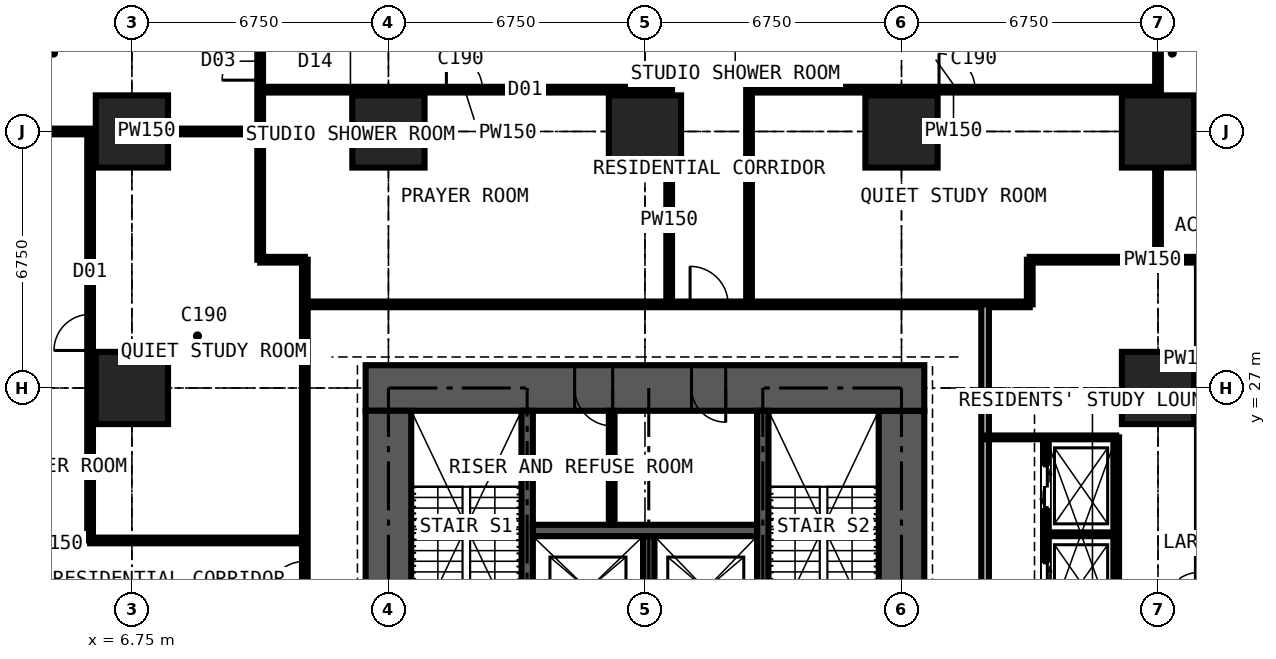
"""IFC4 building model, lengths in metres.
Left out: names, types, materials, properties, quantities, classifications, styles, units other than length and angle.
Written with IfcOpenShell. Run it as: python <this file> out.ifc"""

import sys

from ifc_helpers import new_model, si_unit, direction, frame, frame_2d, origin, origin_2d, place, context, subcontext, project, spatial, rectangle, extrude, element, fill, save


model = new_model("IFC4")
c1 = context("Model", 3, precision=1e-05, world=origin(), true_north=direction((0.0, 1.0)))
c2 = subcontext(c1, "Body", "Model", "MODEL_VIEW")
j1 = project(units=[si_unit("LENGTHUNIT", "METRE"), si_unit("PLANEANGLEUNIT", "RADIAN")], contexts=[c1])
p1 = place(None, origin())
s1 = spatial("IfcSite", under=j1, at=p1, CompositionType="ELEMENT")
p2 = place(p1, origin())
s2 = spatial("IfcBuilding", under=s1, at=p2, CompositionType="ELEMENT")
p3 = place(p2, frame((0.0, 0.0, 39.6)))
s3 = spatial("IfcBuildingStorey", under=s2, at=p3, CompositionType="ELEMENT", Elevation=39.6)
for number, where, z_axis, x_axis in (
    (1, (6.75, 27.0, 0.0), (0.0, 0.0, 1.0), (1.0, 0.0, 0.0)),
    (2, (6.75, 33.75, 0.0), (0.0, 0.0, 1.0), (1.0, 0.0, 0.0)),
    (3, (13.5, 33.75, 0.0), (0.0, 0.0, 1.0), (1.0, 0.0, 0.0)),
    (4, (20.25, 33.75, 0.0), (0.0, 0.0, 1.0), (1.0, 0.0, 0.0)),
    (5, (27.0, 33.75, 0.0), (0.0, 0.0, 1.0), (1.0, 0.0, 0.0)),
    (6, (33.75, 27.0, 0.0), (0.0, 0.0, 1.0), (1.0, 0.0, 0.0)),
    (7, (33.75, 33.75, 0.0), (0.0, 0.0, 1.0), (1.0, 0.0, 0.0)),
):
    element("IfcColumn", number, at=place(p3, frame(where, z_axis=z_axis, x_axis=x_axis)), inside=s3, PredefinedType="COLUMN", context=c2, shape_type="SweptSolid", body=[
        extrude(rectangle(XDim=1.9, YDim=1.9, at=origin_2d()), origin(), (0.0, 0.0, 1.0), 3.6),
    ])
p4 = place(p3, frame((27.0, 14.1, 0.0), z_axis=(0.0, 0.0, 1.0), x_axis=(0.0, 1.0, 0.0)))
e8 = element("IfcWall", 8, at=p4, inside=s3, PredefinedType="SHEAR", context=c2, shape_type="SweptSolid", body=[
    extrude(rectangle(XDim=12.3, YDim=1.2, at=frame_2d((6.15, 0.0))), origin(), (0.0, 0.0, 1.0), 3.6),
])
p5 = place(p4, frame((3.65, 0.0, 0.0)))
e9 = element("IfcOpeningElement", 9, at=p5, cuts=e8, PredefinedType="OPENING", context=c2, shape_type="SweptSolid", body=[
    extrude(rectangle(XDim=1.2, YDim=2.2, at=frame_2d((0.6, 1.1))), frame((0.0, 0.61, 0.0), z_axis=(0.0, -1.0, 0.0), x_axis=(1.0, 0.0, 0.0)), (0.0, 0.0, 1.0), 1.22),
])
p6 = place(p3, frame((27.6, 27.0, 0.0), z_axis=(0.0, 0.0, 1.0), x_axis=(-1.0, 0.0, 0.0)))
e10 = element("IfcWall", 10, at=p6, inside=s3, PredefinedType="SHEAR", context=c2, shape_type="SweptSolid", body=[
    extrude(rectangle(XDim=14.7, YDim=1.2, at=frame_2d((7.35, 0.0))), origin(), (0.0, 0.0, 1.0), 3.6),
])
p7 = place(p6, frame((5.225, 0.0, 0.0)))
e11 = element("IfcOpeningElement", 11, at=p7, cuts=e10, PredefinedType="OPENING", context=c2, shape_type="SweptSolid", body=[
    extrude(rectangle(XDim=0.9, YDim=2.2, at=frame_2d((0.45, 1.1))), frame((0.0, 0.61, 0.0), z_axis=(0.0, -1.0, 0.0), x_axis=(1.0, 0.0, 0.0)), (0.0, 0.0, 1.0), 1.22),
])
p8 = place(p6, frame((8.2, 0.0, 0.0)))
e12 = element("IfcOpeningElement", 12, at=p8, cuts=e10, PredefinedType="OPENING", context=c2, shape_type="SweptSolid", body=[
    extrude(rectangle(XDim=1.0, YDim=2.2, at=frame_2d((0.5, 1.1))), frame((0.0, 0.61, 0.0), z_axis=(0.0, -1.0, 0.0), x_axis=(1.0, 0.0, 0.0)), (0.0, 0.0, 1.0), 1.22),
])
p9 = place(p3, frame((13.5, 26.4, 0.0), z_axis=(0.0, 0.0, 1.0), x_axis=(0.0, -1.0, 0.0)))
e13 = element("IfcWall", 13, at=p9, inside=s3, PredefinedType="SHEAR", context=c2, shape_type="SweptSolid", body=[
    extrude(rectangle(XDim=12.3, YDim=1.2, at=frame_2d((6.15, 0.0))), origin(), (0.0, 0.0, 1.0), 3.6),
])
p10 = place(p9, frame((7.45, 0.0, 0.0)))
e14 = element("IfcOpeningElement", 14, at=p10, cuts=e13, PredefinedType="OPENING", context=c2, shape_type="SweptSolid", body=[
    extrude(rectangle(XDim=1.2, YDim=2.2, at=frame_2d((0.6, 1.1))), frame((0.0, 0.61, 0.0), z_axis=(0.0, -1.0, 0.0), x_axis=(1.0, 0.0, 0.0)), (0.0, 0.0, 1.0), 1.22),
])
for number, where, z_axis, x_axis in (
    (15, (17.15, 20.3, 0.0), (0.0, 0.0, 1.0), (0.0, 1.0, 0.0)),
    (16, (23.35, 20.3, 0.0), (0.0, 0.0, 1.0), (0.0, 1.0, 0.0)),
):
    element("IfcWall", number, at=place(p3, frame(where, z_axis=z_axis, x_axis=x_axis)), inside=s3, PredefinedType="SHEAR", context=c2, shape_type="SweptSolid", body=[
        extrude(rectangle(XDim=6.1, YDim=0.3, at=frame_2d((3.05, 0.0))), origin(), (0.0, 0.0, 1.0), 3.6),
    ])
p11 = place(p3, frame((20.35, 20.3, 0.0), z_axis=(0.0, 0.0, 1.0), x_axis=(0.0, 1.0, 0.0)))
e17 = element("IfcWall", 17, at=p11, inside=s3, PredefinedType="SHEAR", context=c2, shape_type="SweptSolid", body=[
    extrude(rectangle(XDim=2.8, YDim=0.3, at=frame_2d((1.4, 0.0))), origin(), (0.0, 0.0, 1.0), 3.6),
])
p12 = place(p3, frame((17.3, 23.25, 0.0), z_axis=(0.0, 0.0, 1.0), x_axis=(1.0, 0.0, 0.0)))
e18 = element("IfcWall", 18, at=p12, inside=s3, PredefinedType="SHEAR", context=c2, shape_type="SweptSolid", body=[
    extrude(rectangle(XDim=5.9, YDim=0.3, at=frame_2d((2.95, 0.0))), origin(), (0.0, 0.0, 1.0), 3.6),
])
p13 = place(p3, frame((19.375, 23.4, 0.0), z_axis=(0.0, 0.0, 1.0), x_axis=(0.0, 1.0, 0.0)))
e19 = element("IfcWall", 19, at=p13, inside=s3, PredefinedType="PARTITIONING", context=c2, shape_type="SweptSolid", body=[
    extrude(rectangle(XDim=3.0, YDim=0.15, at=frame_2d((1.5, 0.0))), origin(), (0.0, 0.0, 1.0), 3.375),
])
p14 = place(p3, frame((4.15, 33.75, 0.0), z_axis=(0.0, 0.0, 1.0), x_axis=(1.0, 0.0, 0.0)))
e20 = element("IfcWall", 20, at=p14, inside=s3, PredefinedType="PARTITIONING", context=c2, shape_type="SweptSolid", body=[
    extrude(rectangle(XDim=5.975, YDim=0.15, at=frame_2d((2.988, 0.0))), origin(), (0.0, 0.0, 1.0), 2.877),
])
p15 = place(p3, frame((5.65, 22.988, 0.0), z_axis=(0.0, 0.0, 1.0), x_axis=(0.0, 1.0, 0.0)))
e21 = element("IfcWall", 21, at=p15, inside=s3, PredefinedType="PARTITIONING", context=c2, shape_type="SweptSolid", body=[
    extrude(rectangle(XDim=10.762, YDim=0.15, at=frame_2d((5.381, 0.0))), origin(), (0.0, 0.0, 1.0), 3.375),
])
p16 = place(p15, frame((5.0, 0.0, 0.0)))
e22 = element("IfcOpeningElement", 22, at=p16, cuts=e21, PredefinedType="OPENING", context=c2, shape_type="SweptSolid", body=[
    extrude(rectangle(XDim=0.95, YDim=2.2, at=frame_2d((0.475, 1.1))), frame((0.0, 0.085, 0.0), z_axis=(0.0, -1.0, 0.0), x_axis=(1.0, 0.0, 0.0)), (0.0, 0.0, 1.0), 0.17),
])
p17 = place(p3, frame((5.65, 22.988, 0.0), z_axis=(0.0, 0.0, 1.0), x_axis=(1.0, 0.0, 0.0)))
e23 = element("IfcWall", 23, at=p17, inside=s3, PredefinedType="PARTITIONING", context=c2, shape_type="SweptSolid", body=[
    extrude(rectangle(XDim=5.65, YDim=0.15, at=frame_2d((2.825, 0.0))), origin(), (0.0, 0.0, 1.0), 3.375),
])
p18 = place(p3, frame((10.125, 30.375, 0.0), z_axis=(0.0, 0.0, 1.0), x_axis=(0.0, 1.0, 0.0)))
e24 = element("IfcWall", 24, at=p18, inside=s3, PredefinedType="PARTITIONING", context=c2, shape_type="SweptSolid", body=[
    extrude(rectangle(XDim=10.859, YDim=0.15, at=frame_2d((5.429, 0.0))), origin(), (0.0, 0.0, 1.0), 3.375),
])
p19 = place(p18, frame((4.725, 0.0, 0.0)))
e25 = element("IfcOpeningElement", 25, at=p19, cuts=e24, PredefinedType="OPENING", context=c2, shape_type="SweptSolid", body=[
    extrude(rectangle(XDim=1.0, YDim=2.2, at=frame_2d((0.5, 1.1))), frame((0.0, 0.085, 0.0), z_axis=(0.0, -1.0, 0.0), x_axis=(1.0, 0.0, 0.0)), (0.0, 0.0, 1.0), 0.17),
])
p20 = place(p3, frame((10.125, 30.375, 0.0), z_axis=(0.0, 0.0, 1.0), x_axis=(1.0, 0.0, 0.0)))
e26 = element("IfcWall", 26, at=p20, inside=s3, PredefinedType="PARTITIONING", context=c2, shape_type="SweptSolid", body=[
    extrude(rectangle(XDim=1.175, YDim=0.15, at=frame_2d((0.587, 0.0))), origin(), (0.0, 0.0, 1.0), 3.375),
])
p21 = place(p3, frame((10.125, 34.85, 0.0), z_axis=(0.0, 0.0, 1.0), x_axis=(1.0, 0.0, 0.0)))
e27 = element("IfcWall", 27, at=p21, inside=s3, PredefinedType="PARTITIONING", context=c2, shape_type="SweptSolid", body=[
    extrude(rectangle(XDim=10.762, YDim=0.15, at=frame_2d((5.381, 0.0))), origin(), (0.0, 0.0, 1.0), 3.375),
])
p22 = place(p21, frame((4.9, 0.0, 0.0)))
e28 = element("IfcOpeningElement", 28, at=p22, cuts=e27, PredefinedType="OPENING", context=c2, shape_type="SweptSolid", body=[
    extrude(rectangle(XDim=0.95, YDim=2.2, at=frame_2d((0.475, 1.1))), frame((0.0, 0.085, 0.0), z_axis=(0.0, -1.0, 0.0), x_axis=(1.0, 0.0, 0.0)), (0.0, 0.0, 1.0), 0.17),
])
p23 = place(p3, frame((11.3, 11.3, 0.0), z_axis=(0.0, 0.0, 1.0), x_axis=(0.0, 1.0, 0.0)))
e29 = element("IfcWall", 29, at=p23, inside=s3, PredefinedType="PARTITIONING", context=c2, shape_type="SweptSolid", body=[
    extrude(rectangle(XDim=19.075, YDim=0.15, at=frame_2d((9.538, 0.0))), origin(), (0.0, 0.0, 1.0), 3.375),
])
p24 = place(p23, frame((10.137, 0.0, 0.0)))
e30 = element("IfcOpeningElement", 30, at=p24, cuts=e29, PredefinedType="OPENING", context=c2, shape_type="SweptSolid", body=[
    extrude(rectangle(XDim=1.0, YDim=2.2, at=frame_2d((0.5, 1.1))), frame((0.0, 0.085, 0.0), z_axis=(0.0, -1.0, 0.0), x_axis=(1.0, 0.0, 0.0)), (0.0, 0.0, 1.0), 0.17),
])
p25 = place(p3, frame((11.3, 29.2, 0.0), z_axis=(0.0, 0.0, 1.0), x_axis=(1.0, 0.0, 0.0)))
e31 = element("IfcWall", 31, at=p25, inside=s3, PredefinedType="PARTITIONING", context=c2, shape_type="SweptSolid", body=[
    extrude(rectangle(XDim=19.075, YDim=0.15, at=frame_2d((9.538, 0.0))), origin(), (0.0, 0.0, 1.0), 3.375),
])
p26 = place(p25, frame((10.137, 0.0, 0.0)))
e32 = element("IfcOpeningElement", 32, at=p26, cuts=e31, PredefinedType="OPENING", context=c2, shape_type="SweptSolid", body=[
    extrude(rectangle(XDim=1.0, YDim=2.2, at=frame_2d((0.5, 1.1))), frame((0.0, 0.085, 0.0), z_axis=(0.0, -1.0, 0.0), x_axis=(1.0, 0.0, 0.0)), (0.0, 0.0, 1.0), 0.17),
])
p27 = place(p3, frame((20.887, 29.2, 0.0), z_axis=(0.0, 0.0, 1.0), x_axis=(0.0, 1.0, 0.0)))
e33 = element("IfcWall", 33, at=p27, inside=s3, PredefinedType="PARTITIONING", context=c2, shape_type="SweptSolid", body=[
    extrude(rectangle(XDim=5.65, YDim=0.15, at=frame_2d((2.825, 0.0))), origin(), (0.0, 0.0, 1.0), 3.375),
])
p28 = place(p3, frame((22.988, 34.85, 0.0), z_axis=(0.0, 0.0, 1.0), x_axis=(1.0, 0.0, 0.0)))
e34 = element("IfcWall", 34, at=p28, inside=s3, PredefinedType="PARTITIONING", context=c2, shape_type="SweptSolid", body=[
    extrude(rectangle(XDim=10.762, YDim=0.15, at=frame_2d((5.381, 0.0))), origin(), (0.0, 0.0, 1.0), 3.375),
])
p29 = place(p28, frame((5.0, 0.0, 0.0)))
e35 = element("IfcOpeningElement", 35, at=p29, cuts=e34, PredefinedType="OPENING", context=c2, shape_type="SweptSolid", body=[
    extrude(rectangle(XDim=0.95, YDim=2.2, at=frame_2d((0.475, 1.1))), frame((0.0, 0.085, 0.0), z_axis=(0.0, -1.0, 0.0), x_axis=(1.0, 0.0, 0.0)), (0.0, 0.0, 1.0), 0.17),
])
p30 = place(p3, frame((22.988, 29.2, 0.0), z_axis=(0.0, 0.0, 1.0), x_axis=(0.0, 1.0, 0.0)))
e36 = element("IfcWall", 36, at=p30, inside=s3, PredefinedType="PARTITIONING", context=c2, shape_type="SweptSolid", body=[
    extrude(rectangle(XDim=5.65, YDim=0.15, at=frame_2d((2.825, 0.0))), origin(), (0.0, 0.0, 1.0), 3.375),
])
p31 = place(p3, frame((29.2, 11.3, 0.0), z_axis=(0.0, 0.0, 1.0), x_axis=(0.0, 1.0, 0.0)))
e37 = element("IfcWall", 37, at=p31, inside=s3, PredefinedType="PARTITIONING", context=c2, shape_type="SweptSolid", body=[
    extrude(rectangle(XDim=17.9, YDim=0.2, at=frame_2d((8.95, 0.0))), origin(), (0.0, 0.0, 1.0), 3.375),
])
p32 = place(p31, frame((8.35, 0.0, 0.0)))
e38 = element("IfcOpeningElement", 38, at=p32, cuts=e37, PredefinedType="OPENING", context=c2, shape_type="SweptSolid", body=[
    extrude(rectangle(XDim=1.2, YDim=2.2, at=frame_2d((0.6, 1.1))), frame((0.0, 0.11, 0.0), z_axis=(0.0, -1.0, 0.0), x_axis=(1.0, 0.0, 0.0)), (0.0, 0.0, 1.0), 0.22),
])
p33 = place(p3, frame((29.2, 25.7, 0.0), z_axis=(0.0, 0.0, 1.0), x_axis=(1.0, 0.0, 0.0)))
e39 = element("IfcWall", 39, at=p33, inside=s3, PredefinedType="SHEAR", context=c2, shape_type="SweptSolid", body=[
    extrude(rectangle(XDim=3.45, YDim=0.1, at=frame_2d((1.725, 0.0))), origin(), (0.0, 0.0, 1.0), 3.375),
])
p34 = place(p3, frame((30.375, 29.2, 0.0), z_axis=(0.0, 0.0, 1.0), x_axis=(0.0, 1.0, 0.0)))
e40 = element("IfcWall", 40, at=p34, inside=s3, PredefinedType="PARTITIONING", context=c2, shape_type="SweptSolid", body=[
    extrude(rectangle(XDim=1.175, YDim=0.15, at=frame_2d((0.587, 0.0))), origin(), (0.0, 0.0, 1.0), 3.375),
])
p35 = place(p3, frame((30.375, 30.375, 0.0), z_axis=(0.0, 0.0, 1.0), x_axis=(1.0, 0.0, 0.0)))
e41 = element("IfcWall", 41, at=p35, inside=s3, PredefinedType="PARTITIONING", context=c2, shape_type="SweptSolid", body=[
    extrude(rectangle(XDim=10.859, YDim=0.15, at=frame_2d((5.429, 0.0))), origin(), (0.0, 0.0, 1.0), 3.375),
])
p36 = place(p35, frame((4.725, 0.0, 0.0)))
e42 = element("IfcOpeningElement", 42, at=p36, cuts=e41, PredefinedType="OPENING", context=c2, shape_type="SweptSolid", body=[
    extrude(rectangle(XDim=1.0, YDim=2.2, at=frame_2d((0.5, 1.1))), frame((0.0, 0.085, 0.0), z_axis=(0.0, -1.0, 0.0), x_axis=(1.0, 0.0, 0.0)), (0.0, 0.0, 1.0), 0.17),
])
p37 = place(p3, frame((30.8, 14.8, 0.0), z_axis=(0.0, 0.0, 1.0), x_axis=(0.0, 1.0, 0.0)))
e43 = element("IfcWall", 43, at=p37, inside=s3, PredefinedType="PARTITIONING", context=c2, shape_type="SweptSolid", body=[
    extrude(rectangle(XDim=10.9, YDim=0.15, at=frame_2d((5.45, 0.0))), origin(), (0.0, 0.0, 1.0), 3.375),
])
p38 = place(p37, frame((0.75, 0.0, 0.0)))
e44 = element("IfcOpeningElement", 44, at=p38, cuts=e43, PredefinedType="OPENING", context=c2, shape_type="SweptSolid", body=[
    extrude(rectangle(XDim=1.1, YDim=2.2, at=frame_2d((0.55, 1.1))), frame((0.0, 0.085, 0.0), z_axis=(0.0, -1.0, 0.0), x_axis=(1.0, 0.0, 0.0)), (0.0, 0.0, 1.0), 0.17),
])
p39 = place(p37, frame((3.25, 0.0, 0.0)))
e45 = element("IfcOpeningElement", 45, at=p39, cuts=e43, PredefinedType="OPENING", context=c2, shape_type="SweptSolid", body=[
    extrude(rectangle(XDim=1.1, YDim=2.2, at=frame_2d((0.55, 1.1))), frame((0.0, 0.085, 0.0), z_axis=(0.0, -1.0, 0.0), x_axis=(1.0, 0.0, 0.0)), (0.0, 0.0, 1.0), 0.17),
])
p40 = place(p37, frame((6.5, 0.0, 0.0)))
e46 = element("IfcOpeningElement", 46, at=p40, cuts=e43, PredefinedType="OPENING", context=c2, shape_type="SweptSolid", body=[
    extrude(rectangle(XDim=1.1, YDim=2.2, at=frame_2d((0.55, 1.1))), frame((0.0, 0.085, 0.0), z_axis=(0.0, -1.0, 0.0), x_axis=(1.0, 0.0, 0.0)), (0.0, 0.0, 1.0), 0.17),
])
p41 = place(p37, frame((9.05, 0.0, 0.0)))
e47 = element("IfcOpeningElement", 47, at=p41, cuts=e43, PredefinedType="OPENING", context=c2, shape_type="SweptSolid", body=[
    extrude(rectangle(XDim=1.1, YDim=2.2, at=frame_2d((0.55, 1.1))), frame((0.0, 0.085, 0.0), z_axis=(0.0, -1.0, 0.0), x_axis=(1.0, 0.0, 0.0)), (0.0, 0.0, 1.0), 0.17),
])
p42 = place(p3, frame((30.8, 23.15, 0.0), z_axis=(0.0, 0.0, 1.0), x_axis=(1.0, 0.0, 0.0)))
e48 = element("IfcWall", 48, at=p42, inside=s3, PredefinedType="SHEAR", context=c2, shape_type="SweptSolid", body=[
    extrude(rectangle(XDim=1.85, YDim=0.1, at=frame_2d((0.925, 0.0))), origin(), (0.0, 0.0, 1.0), 3.375),
])
p43 = place(p3, frame((32.65, 20.6, 0.0), z_axis=(0.0, 0.0, 1.0), x_axis=(0.0, 1.0, 0.0)))
e49 = element("IfcWall", 49, at=p43, inside=s3, PredefinedType="PARTITIONING", context=c2, shape_type="SweptSolid", body=[
    extrude(rectangle(XDim=5.1, YDim=0.15, at=frame_2d((2.55, 0.0))), origin(), (0.0, 0.0, 1.0), 3.375),
])
p44 = place(p3, frame((33.75, 30.375, 0.0), z_axis=(0.0, 0.0, 1.0), x_axis=(0.0, 1.0, 0.0)))
e50 = element("IfcWall", 50, at=p44, inside=s3, PredefinedType="PARTITIONING", context=c2, shape_type="SweptSolid", body=[
    extrude(rectangle(XDim=5.975, YDim=0.15, at=frame_2d((2.988, 0.0))), origin(), (0.0, 0.0, 1.0), 2.877),
])
p45 = place(p7, origin())
e51 = element("IfcDoor", 51, at=p45, inside=s3, OperationType="SINGLE_SWING_LEFT", PredefinedType="DOOR", context=c2, shape_type="SweptSolid", body=[
    extrude(rectangle(XDim=0.9, YDim=2.2, at=frame_2d((0.45, 1.1))), frame((0.0, 0.4, 0.0), z_axis=(0.0, -1.0, 0.0), x_axis=(1.0, 0.0, 0.0)), (0.0, 0.0, 1.0), 0.8),
])
fill(e11, e51)
p46 = place(p8, origin())
e52 = element("IfcDoor", 52, at=p46, inside=s3, OperationType="SINGLE_SWING_LEFT", PredefinedType="DOOR", context=c2, shape_type="SweptSolid", body=[
    extrude(rectangle(XDim=1.0, YDim=2.2, at=frame_2d((0.5, 1.1))), frame((0.0, 0.025, 0.0), z_axis=(0.0, -1.0, 0.0), x_axis=(1.0, 0.0, 0.0)), (0.0, 0.0, 1.0), 0.05),
])
fill(e12, e52)
p47 = place(p26, origin())
e53 = element("IfcDoor", 53, at=p47, inside=s3, OperationType="SINGLE_SWING_LEFT", PredefinedType="DOOR", context=c2, shape_type="SweptSolid", body=[
    extrude(rectangle(XDim=1.0, YDim=2.2, at=frame_2d((0.5, 1.1))), frame((0.0, 0.025, 0.0), z_axis=(0.0, -1.0, 0.0), x_axis=(1.0, 0.0, 0.0)), (0.0, 0.0, 1.0), 0.05),
])
fill(e32, e53)
p48 = place(p22, origin())
e54 = element("IfcDoor", 54, at=p48, inside=s3, OperationType="SINGLE_SWING_LEFT", PredefinedType="DOOR", context=c2, shape_type="SweptSolid", body=[
    extrude(rectangle(XDim=0.95, YDim=2.2, at=frame_2d((0.475, 1.1))), frame((0.0, 0.025, 0.0), z_axis=(0.0, -1.0, 0.0), x_axis=(1.0, 0.0, 0.0)), (0.0, 0.0, 1.0), 0.05),
])
fill(e28, e54)
p49 = place(p29, origin())
e55 = element("IfcDoor", 55, at=p49, inside=s3, OperationType="SINGLE_SWING_LEFT", PredefinedType="DOOR", context=c2, shape_type="SweptSolid", body=[
    extrude(rectangle(XDim=0.95, YDim=2.2, at=frame_2d((0.475, 1.1))), frame((0.0, 0.025, 0.0), z_axis=(0.0, -1.0, 0.0), x_axis=(1.0, 0.0, 0.0)), (0.0, 0.0, 1.0), 0.05),
])
fill(e35, e55)
p50 = place(p19, origin())
e56 = element("IfcDoor", 56, at=p50, inside=s3, OperationType="SINGLE_SWING_LEFT", PredefinedType="DOOR", context=c2, shape_type="SweptSolid", body=[
    extrude(rectangle(XDim=1.0, YDim=2.2, at=frame_2d((0.5, 1.1))), frame((0.0, 0.025, 0.0), z_axis=(0.0, -1.0, 0.0), x_axis=(1.0, 0.0, 0.0)), (0.0, 0.0, 1.0), 0.05),
])
fill(e25, e56)
p51 = place(p24, origin())
e57 = element("IfcDoor", 57, at=p51, inside=s3, OperationType="SINGLE_SWING_LEFT", PredefinedType="DOOR", context=c2, shape_type="SweptSolid", body=[
    extrude(rectangle(XDim=1.0, YDim=2.2, at=frame_2d((0.5, 1.1))), frame((0.0, 0.025, 0.0), z_axis=(0.0, -1.0, 0.0), x_axis=(1.0, 0.0, 0.0)), (0.0, 0.0, 1.0), 0.05),
])
fill(e30, e57)
p52 = place(p16, origin())
e58 = element("IfcDoor", 58, at=p52, inside=s3, OperationType="SINGLE_SWING_LEFT", PredefinedType="DOOR", context=c2, shape_type="SweptSolid", body=[
    extrude(rectangle(XDim=0.95, YDim=2.2, at=frame_2d((0.475, 1.1))), frame((0.0, 0.025, 0.0), z_axis=(0.0, -1.0, 0.0), x_axis=(1.0, 0.0, 0.0)), (0.0, 0.0, 1.0), 0.05),
])
fill(e22, e58)
p53 = place(p40, origin())
e59 = element("IfcDoor", 59, at=p53, inside=s3, OperationType="DOUBLE_DOOR_SLIDING", PredefinedType="DOOR", context=c2, shape_type="SweptSolid", body=[
    extrude(rectangle(XDim=1.1, YDim=2.2, at=frame_2d((0.55, 1.1))), frame((0.0, 0.025, 0.0), z_axis=(0.0, -1.0, 0.0), x_axis=(1.0, 0.0, 0.0)), (0.0, 0.0, 1.0), 0.05),
])
fill(e46, e59)
p54 = place(p41, origin())
e60 = element("IfcDoor", 60, at=p54, inside=s3, OperationType="DOUBLE_DOOR_SLIDING", PredefinedType="DOOR", context=c2, shape_type="SweptSolid", body=[
    extrude(rectangle(XDim=1.1, YDim=2.2, at=frame_2d((0.55, 1.1))), frame((0.0, 0.025, 0.0), z_axis=(0.0, -1.0, 0.0), x_axis=(1.0, 0.0, 0.0)), (0.0, 0.0, 1.0), 0.05),
])
fill(e47, e60)
save(model, sys.argv[1])
